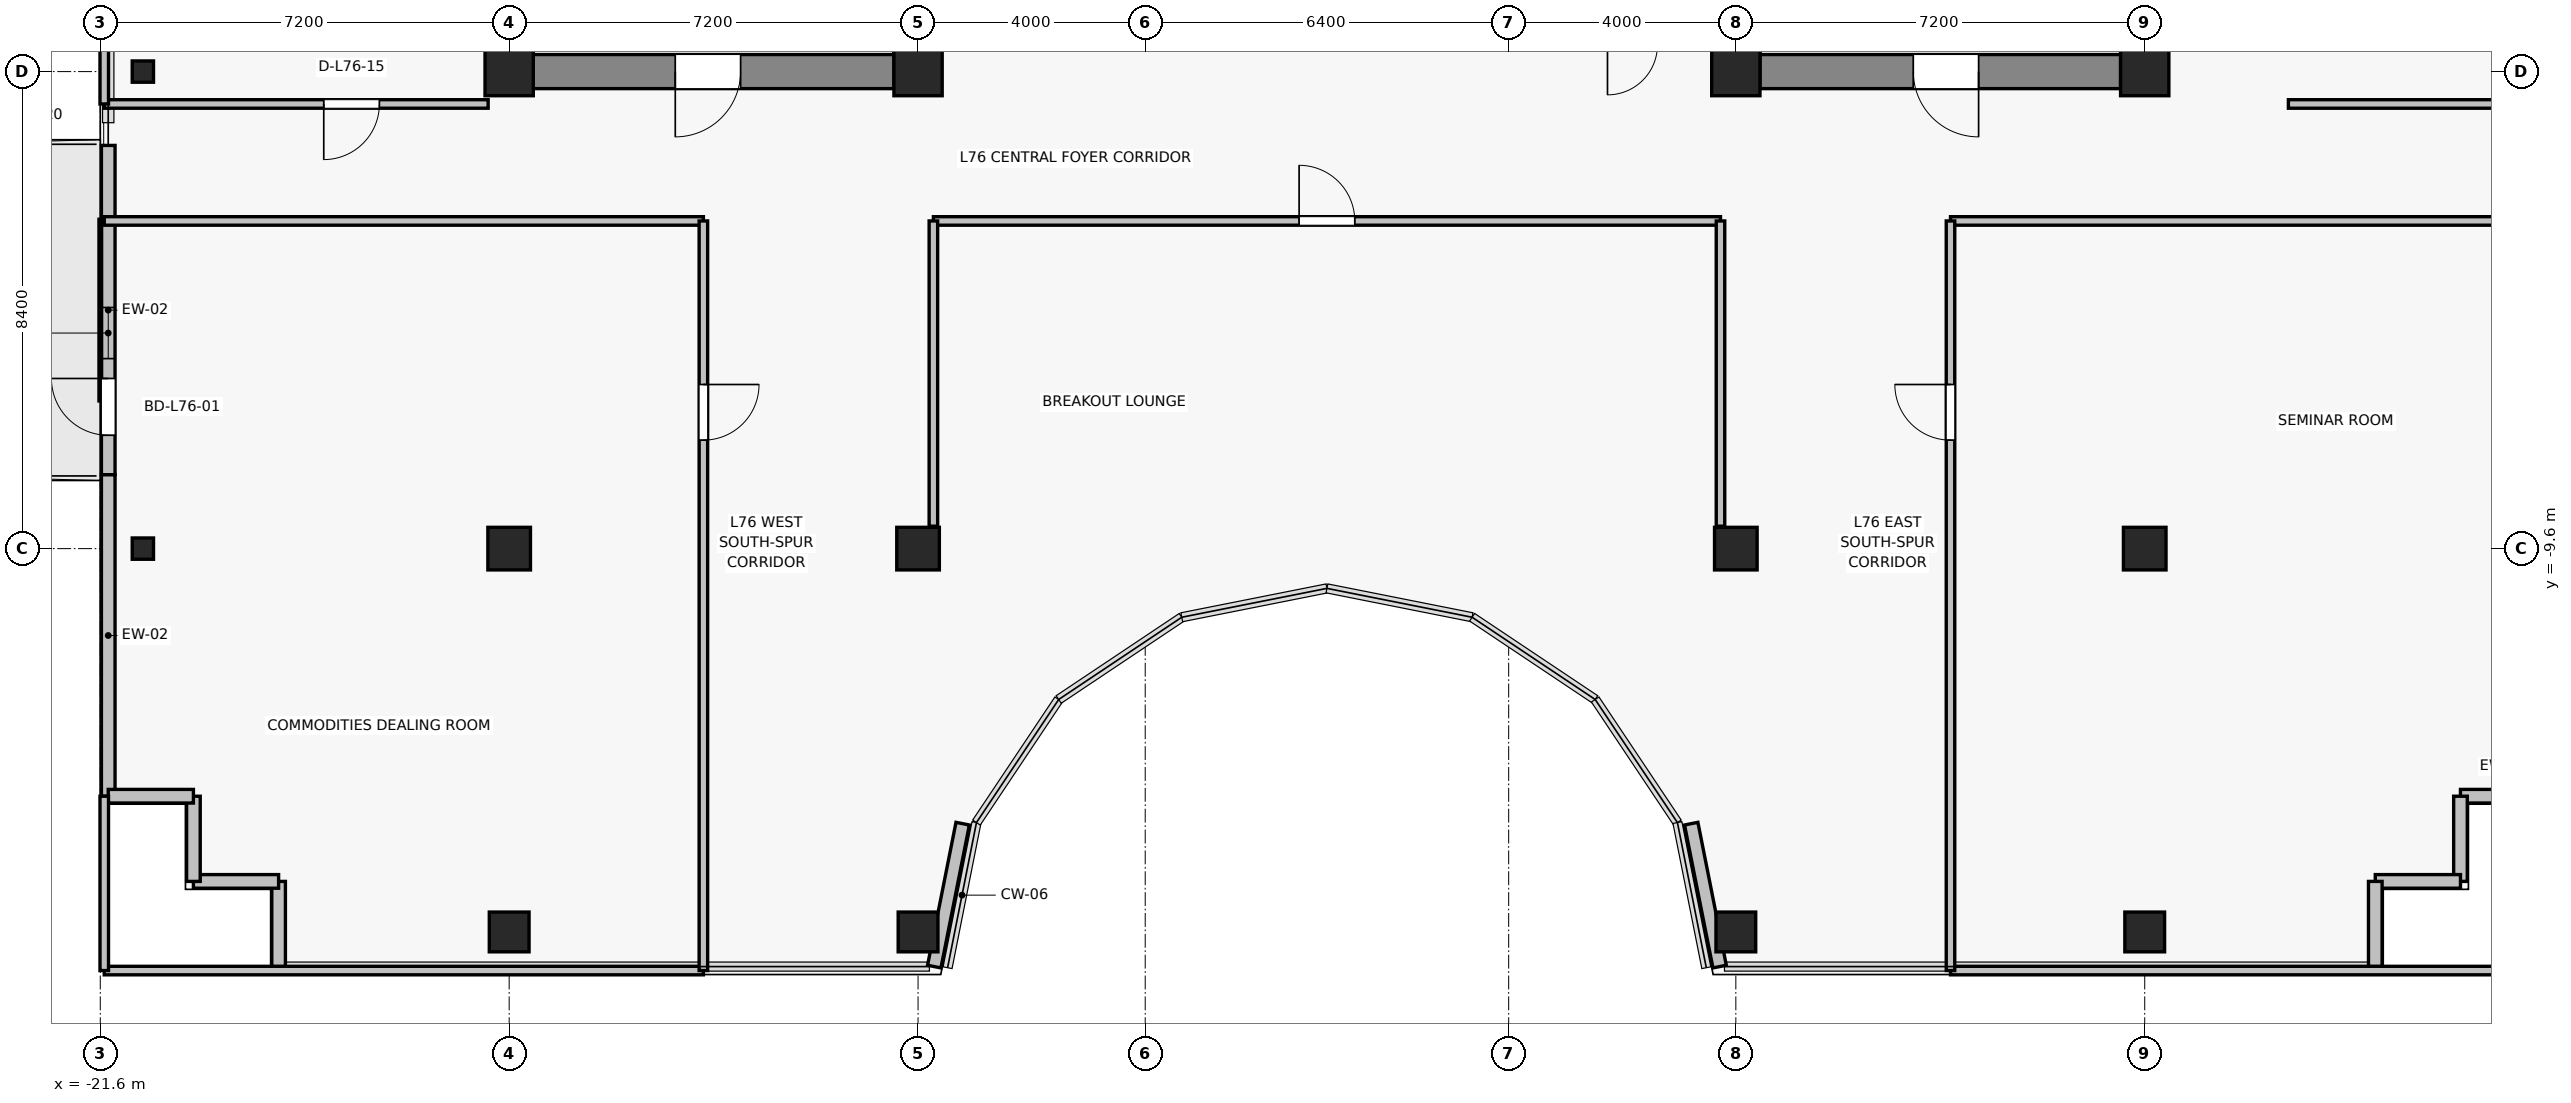
"""IFC4 building model, lengths in metres.
Left out: names, types, materials, properties, quantities, classifications, styles, units other than length and angle.
Written with IfcOpenShell. Run it as: python <this file> out.ifc"""

import sys

from ifc_helpers import new_model, si_unit, direction, frame, frame_2d, origin, origin_2d, place, context, subcontext, project, spatial, rectangle, i_section, extrude, source, transform, mapped, element, fill, save


model = new_model("IFC4")
c1 = context("Model", 3, precision=1e-05, world=origin(), true_north=direction((0.0, 1.0)))
c2 = subcontext(c1, "Body", "Model", "MODEL_VIEW")
j1 = project(units=[si_unit("LENGTHUNIT", "METRE"), si_unit("PLANEANGLEUNIT", "RADIAN")], contexts=[c1])
p1 = place(None, origin())
s1 = spatial("IfcSite", under=j1, at=p1, CompositionType="ELEMENT")
p2 = place(p1, origin())
s2 = spatial("IfcBuilding", under=s1, at=p2, CompositionType="ELEMENT")
p3 = place(p2, frame((0.0, 0.0, 268.3)))
s3 = spatial("IfcBuildingStorey", under=s2, at=p3, CompositionType="ELEMENT", Elevation=268.3)
for number, where, z_axis, x_axis in (
    (1, (-14.4, -1.2, 0.0), (0.0, 0.0, 1.0), (1.0, 0.0, 0.0)),
    (2, (-7.2, -1.2, 0.0), (0.0, 0.0, 1.0), (1.0, 0.0, 0.0)),
    (3, (7.2, -1.2, 0.0), (0.0, 0.0, 1.0), (1.0, 0.0, 0.0)),
    (4, (14.4, -1.2, 0.0), (0.0, 0.0, 1.0), (1.0, 0.0, 0.0)),
):
    element("IfcColumn", number, at=place(p3, frame(where, z_axis=z_axis, x_axis=x_axis)), inside=s3, PredefinedType="COLUMN", context=c2, shape_type="SweptSolid", body=[
        extrude(rectangle(XDim=0.85, YDim=0.85, at=origin_2d()), origin(), (0.0, 0.0, 1.0), 3.3),
    ])
for number, where, z_axis, x_axis in (
    (5, (-14.4, -9.6, 0.0), (0.0, 0.0, 1.0), (1.0, 0.0, 0.0)),
    (6, (-7.2, -9.6, 0.0), (0.0, 0.0, 1.0), (1.0, 0.0, 0.0)),
    (7, (7.2, -9.6, 0.0), (0.0, 0.0, 1.0), (1.0, 0.0, 0.0)),
    (8, (14.4, -9.6, 0.0), (0.0, 0.0, 1.0), (1.0, 0.0, 0.0)),
):
    element("IfcColumn", number, at=place(p3, frame(where, z_axis=z_axis, x_axis=x_axis)), inside=s3, PredefinedType="COLUMN", context=c2, shape_type="SweptSolid", body=[
        extrude(rectangle(XDim=0.75, YDim=0.75, at=origin_2d()), origin(), (0.0, 0.0, 1.0), 3.3),
    ])
for number, where, z_axis, x_axis in (
    (9, (-14.4, -16.35, 0.0), (0.0, 0.0, 1.0), (1.0, 0.0, 0.0)),
    (10, (-7.2, -16.35, 0.0), (0.0, 0.0, 1.0), (1.0, 0.0, 0.0)),
    (11, (7.2, -16.35, 0.0), (0.0, 0.0, 1.0), (1.0, 0.0, 0.0)),
    (12, (14.4, -16.35, 0.0), (0.0, 0.0, 1.0), (1.0, 0.0, 0.0)),
):
    element("IfcColumn", number, at=place(p3, frame(where, z_axis=z_axis, x_axis=x_axis)), inside=s3, PredefinedType="COLUMN", context=c2, shape_type="SweptSolid", body=[
        extrude(rectangle(XDim=0.7, YDim=0.7, at=origin_2d()), origin(), (0.0, 0.0, 1.0), 3.3),
    ])
for number, where, z_axis, x_axis in (
    (13, (-20.85, -9.6, 0.0), (0.0, 0.0, 1.0), (1.0, 0.0, 0.0)),
    (14, (-20.85, -1.2, 0.0), (0.0, 0.0, 1.0), (1.0, 0.0, 0.0)),
):
    element("IfcColumn", number, at=place(p3, frame(where, z_axis=z_axis, x_axis=x_axis)), inside=s3, PredefinedType="COLUMN", context=c2, shape_type="SweptSolid", body=[
        extrude(i_section(OverallWidth=0.375, OverallDepth=0.375, WebThickness=0.017, FlangeThickness=0.027, FilletRadius=0.015, at=origin_2d()), origin(), (0.0, 0.0, 1.0), 3.3),
    ])
p4 = place(p3, frame((-7.625, -1.2, 0.0), z_axis=(0.0, 0.0, 1.0), x_axis=(-1.0, 0.0, 0.0)))
e15 = element("IfcWall", 15, at=p4, inside=s3, PredefinedType="SHEAR", context=c2, shape_type="SweptSolid", body=[
    extrude(rectangle(XDim=6.35, YDim=0.6, at=frame_2d((3.175, 0.0))), origin(), (0.0, 0.0, 1.0), 3.08),
])
p5 = place(p4, frame((2.7, 0.0, 0.0)))
e16 = element("IfcOpeningElement", 16, at=p5, cuts=e15, PredefinedType="OPENING", context=c2, shape_type="SweptSolid", body=[
    extrude(rectangle(XDim=1.15, YDim=2.15, at=frame_2d((0.575, 1.075))), frame((0.0, 0.31, 0.0), z_axis=(0.0, -1.0, 0.0), x_axis=(1.0, 0.0, 0.0)), (0.0, 0.0, 1.0), 0.62),
])
p6 = place(p3, frame((13.975, -1.2, 0.0), z_axis=(0.0, 0.0, 1.0), x_axis=(-1.0, 0.0, 0.0)))
e17 = element("IfcWall", 17, at=p6, inside=s3, PredefinedType="SHEAR", context=c2, shape_type="SweptSolid", body=[
    extrude(rectangle(XDim=6.35, YDim=0.6, at=frame_2d((3.175, 0.0))), origin(), (0.0, 0.0, 1.0), 3.08),
])
p7 = place(p6, frame((2.5, 0.0, 0.0)))
e18 = element("IfcOpeningElement", 18, at=p7, cuts=e17, PredefinedType="OPENING", context=c2, shape_type="SweptSolid", body=[
    extrude(rectangle(XDim=1.15, YDim=2.15, at=frame_2d((0.575, 1.075))), frame((0.0, 0.31, 0.0), z_axis=(0.0, -1.0, 0.0), x_axis=(1.0, 0.0, 0.0)), (0.0, 0.0, 1.0), 0.62),
])
for number, where, z_axis, x_axis in (
    (19, (-7.4, -0.9, 0.0), (0.0, 0.0, 1.0), (0.0, 1.0, 0.0)),
    (20, (7.4, -0.9, 0.0), (0.0, 0.0, 1.0), (0.0, 1.0, 0.0)),
):
    element("IfcWall", number, at=place(p3, frame(where, z_axis=z_axis, x_axis=x_axis)), inside=s3, PredefinedType="SHEAR", context=c2, shape_type="SweptSolid", body=[
        extrude(rectangle(XDim=4.15, YDim=0.45, at=frame_2d((2.075, 0.0))), origin(), (0.0, 0.0, 1.0), 3.08),
    ])
p8 = place(p3, frame((-21.46, -8.3, 0.0), z_axis=(0.0, 0.0, 1.0), x_axis=(0.0, 1.0, 0.0)))
e21 = element("IfcWall", 21, at=p8, inside=s3, PredefinedType="SOLIDWALL", context=c2, shape_type="SweptSolid", body=[
    extrude(rectangle(XDim=5.8, YDim=0.24, at=frame_2d((2.9, 0.0))), origin(), (0.0, 0.0, 1.0), 3.08),
])
p9 = place(p8, frame((0.696, 0.0, 0.0)))
e22 = element("IfcOpeningElement", 22, at=p9, cuts=e21, PredefinedType="OPENING", context=c2, shape_type="SweptSolid", body=[
    extrude(rectangle(XDim=1.0, YDim=2.2, at=frame_2d((0.5, 1.1))), frame((0.0, 0.13, 0.0), z_axis=(0.0, -1.0, 0.0), x_axis=(1.0, 0.0, 0.0)), (0.0, 0.0, 1.0), 0.26),
])
p10 = place(p8, frame((2.046, 0.0, 0.85)))
e23 = element("IfcOpeningElement", 23, at=p10, cuts=e21, PredefinedType="OPENING", context=c2, shape_type="SweptSolid", body=[
    extrude(rectangle(XDim=0.9, YDim=1.35, at=frame_2d((0.45, 0.675))), frame((0.0, 0.13, 0.0), z_axis=(0.0, -1.0, 0.0), x_axis=(1.0, 0.0, 0.0)), (0.0, 0.0, 1.0), 0.26),
])
p11 = place(p3, frame((-21.46, -8.3, 0.0), z_axis=(0.0, 0.0, 1.0), x_axis=(0.0, -1.0, 0.0)))
e24 = element("IfcWall", 24, at=p11, inside=s3, PredefinedType="SOLIDWALL", context=c2, shape_type="SweptSolid", body=[
    extrude(rectangle(XDim=5.66, YDim=0.24, at=frame_2d((2.83, 0.0))), origin(), (0.0, 0.0, 1.0), 3.08),
])
for number, where, z_axis, x_axis in (
    (25, (19.96, -13.96, 0.0), (0.0, 0.0, 1.0), (1.0, 0.0, 0.0)),
    (26, (19.96, -15.46, 0.0), (0.0, 0.0, 1.0), (0.0, 1.0, 0.0)),
    (27, (18.46, -15.46, 0.0), (0.0, 0.0, 1.0), (1.0, 0.0, 0.0)),
    (28, (18.46, -16.96, 0.0), (0.0, 0.0, 1.0), (0.0, 1.0, 0.0)),
):
    element("IfcWall", number, at=place(p3, frame(where, z_axis=z_axis, x_axis=x_axis)), inside=s3, PredefinedType="SOLIDWALL", context=c2, shape_type="SweptSolid", body=[
        extrude(rectangle(XDim=1.5, YDim=0.24, at=frame_2d((0.75, 0.0))), origin(), (0.0, 0.0, 1.0), 3.08),
    ])
for number, where, z_axis, x_axis in (
    (29, (6.414, -14.443, 0.0), (0.0, 0.0, 1.0), (0.195, -0.981, 0.0)),
    (30, (-6.915, -16.96, 0.0), (0.0, 0.0, 1.0), (0.195, 0.981, 0.0)),
):
    element("IfcWall", number, at=place(p3, frame(where, z_axis=z_axis, x_axis=x_axis)), inside=s3, PredefinedType="SOLIDWALL", context=c2, shape_type="SweptSolid", body=[
        extrude(rectangle(XDim=2.566, YDim=0.24, at=frame_2d((1.283, 0.0))), origin(), (0.0, 0.0, 1.0), 2.79),
    ])
for number, where, z_axis, x_axis in (
    (31, (-18.46, -15.46, 0.0), (0.0, 0.0, 1.0), (0.0, -1.0, 0.0)),
    (32, (-19.96, -15.46, 0.0), (0.0, 0.0, 1.0), (1.0, 0.0, 0.0)),
    (33, (-19.96, -13.96, 0.0), (0.0, 0.0, 1.0), (0.0, -1.0, 0.0)),
    (34, (-21.46, -13.96, 0.0), (0.0, 0.0, 1.0), (1.0, 0.0, 0.0)),
):
    element("IfcWall", number, at=place(p3, frame(where, z_axis=z_axis, x_axis=x_axis)), inside=s3, PredefinedType="SOLIDWALL", context=c2, shape_type="SweptSolid", body=[
        extrude(rectangle(XDim=1.5, YDim=0.24, at=frame_2d((0.75, 0.0))), origin(), (0.0, 0.0, 1.0), 3.08),
    ])
p12 = place(p3, frame((-10.98, -17.03, 0.0), z_axis=(0.0, 0.0, 1.0), x_axis=(-1.0, 0.0, 0.0)))
e35 = element("IfcWall", 35, at=p12, inside=s3, PredefinedType="PARTITIONING", context=c2, shape_type="SweptSolid", body=[
    extrude(rectangle(XDim=10.55, YDim=0.15, at=frame_2d((5.275, 0.0))), origin(), (0.0, 0.0, 1.0), 3.08),
])
p13 = place(p3, frame((-21.53, -3.83, 0.0), z_axis=(0.0, 0.0, 1.0), x_axis=(1.0, 0.0, 0.0)))
e36 = element("IfcWall", 36, at=p13, inside=s3, PredefinedType="PARTITIONING", context=c2, shape_type="SweptSolid", body=[
    extrude(rectangle(XDim=10.55, YDim=0.15, at=frame_2d((5.275, 0.0))), origin(), (0.0, 0.0, 1.0), 2.47),
])
p14 = place(p3, frame((-21.53, -17.03, 0.0), z_axis=(0.0, 0.0, 1.0), x_axis=(0.0, 1.0, 0.0)))
e37 = element("IfcWall", 37, at=p14, inside=s3, PredefinedType="PARTITIONING", context=c2, shape_type="SweptSolid", body=[
    extrude(rectangle(XDim=3.07, YDim=0.15, at=frame_2d((1.535, 0.0))), origin(), (0.0, 0.0, 1.0), 3.08),
])
p15 = place(p3, frame((-10.98, -3.83, 0.0), z_axis=(0.0, 0.0, 1.0), x_axis=(0.0, -1.0, 0.0)))
e38 = element("IfcWall", 38, at=p15, inside=s3, PredefinedType="PARTITIONING", context=c2, shape_type="SweptSolid", body=[
    extrude(rectangle(XDim=13.2, YDim=0.15, at=frame_2d((6.6, 0.0))), origin(), (0.0, 0.0, 1.0), 2.47),
])
p16 = place(p15, frame((2.88, 0.0, 0.0)))
e39 = element("IfcOpeningElement", 39, at=p16, cuts=e38, PredefinedType="OPENING", context=c2, shape_type="SweptSolid", body=[
    extrude(rectangle(XDim=0.98, YDim=2.15, at=frame_2d((0.49, 1.075))), frame((0.0, 0.085, 0.0), z_axis=(0.0, -1.0, 0.0), x_axis=(1.0, 0.0, 0.0)), (0.0, 0.0, 1.0), 0.17),
])
p17 = place(p3, frame((21.53, -17.03, 0.0), z_axis=(0.0, 0.0, 1.0), x_axis=(-1.0, 0.0, 0.0)))
e40 = element("IfcWall", 40, at=p17, inside=s3, PredefinedType="PARTITIONING", context=c2, shape_type="SweptSolid", body=[
    extrude(rectangle(XDim=10.55, YDim=0.15, at=frame_2d((5.275, 0.0))), origin(), (0.0, 0.0, 1.0), 3.08),
])
p18 = place(p3, frame((10.98, -3.83, 0.0), z_axis=(0.0, 0.0, 1.0), x_axis=(1.0, 0.0, 0.0)))
e41 = element("IfcWall", 41, at=p18, inside=s3, PredefinedType="PARTITIONING", context=c2, shape_type="SweptSolid", body=[
    extrude(rectangle(XDim=10.55, YDim=0.15, at=frame_2d((5.275, 0.0))), origin(), (0.0, 0.0, 1.0), 2.47),
])
p19 = place(p3, frame((10.98, -17.03, 0.0), z_axis=(0.0, 0.0, 1.0), x_axis=(0.0, 1.0, 0.0)))
e42 = element("IfcWall", 42, at=p19, inside=s3, PredefinedType="PARTITIONING", context=c2, shape_type="SweptSolid", body=[
    extrude(rectangle(XDim=13.2, YDim=0.15, at=frame_2d((6.6, 0.0))), origin(), (0.0, 0.0, 1.0), 2.47),
])
p20 = place(p19, frame((9.34, 0.0, 0.0)))
e43 = element("IfcOpeningElement", 43, at=p20, cuts=e42, PredefinedType="OPENING", context=c2, shape_type="SweptSolid", body=[
    extrude(rectangle(XDim=0.98, YDim=2.15, at=frame_2d((0.49, 1.075))), frame((0.0, 0.085, 0.0), z_axis=(0.0, -1.0, 0.0), x_axis=(1.0, 0.0, 0.0)), (0.0, 0.0, 1.0), 0.17),
])
p21 = place(p3, frame((-6.93, -3.83, 0.0), z_axis=(0.0, 0.0, 1.0), x_axis=(1.0, 0.0, 0.0)))
e44 = element("IfcWall", 44, at=p21, inside=s3, PredefinedType="PARTITIONING", context=c2, shape_type="SweptSolid", body=[
    extrude(rectangle(XDim=13.86, YDim=0.15, at=frame_2d((6.93, 0.0))), origin(), (0.0, 0.0, 1.0), 2.47),
])
p22 = place(p21, frame((6.44, 0.0, 0.0)))
e45 = element("IfcOpeningElement", 45, at=p22, cuts=e44, PredefinedType="OPENING", context=c2, shape_type="SweptSolid", body=[
    extrude(rectangle(XDim=0.98, YDim=2.15, at=frame_2d((0.49, 1.075))), frame((0.0, 0.085, 0.0), z_axis=(0.0, -1.0, 0.0), x_axis=(1.0, 0.0, 0.0)), (0.0, 0.0, 1.0), 0.17),
])
for number, where, z_axis, x_axis in (
    (46, (-6.93, -9.205, 0.0), (0.0, 0.0, 1.0), (0.0, 1.0, 0.0)),
    (47, (6.93, -3.83, 0.0), (0.0, 0.0, 1.0), (0.0, -1.0, 0.0)),
):
    element("IfcWall", number, at=place(p3, frame(where, z_axis=z_axis, x_axis=x_axis)), inside=s3, PredefinedType="PARTITIONING", context=c2, shape_type="SweptSolid", body=[
        extrude(rectangle(XDim=5.375, YDim=0.15, at=frame_2d((2.688, 0.0))), origin(), (0.0, 0.0, 1.0), 2.47),
    ])
p23 = place(p3, frame((-14.77, -1.77, 0.0), z_axis=(0.0, 0.0, 1.0), x_axis=(-1.0, 0.0, 0.0)))
e48 = element("IfcWall", 48, at=p23, inside=s3, PredefinedType="PARTITIONING", context=c2, shape_type="SweptSolid", body=[
    extrude(rectangle(XDim=6.76, YDim=0.15, at=frame_2d((3.38, 0.0))), origin(), (0.0, 0.0, 1.0), 2.79),
])
p24 = place(p23, frame((1.915, 0.0, 0.0)))
e49 = element("IfcOpeningElement", 49, at=p24, cuts=e48, PredefinedType="OPENING", context=c2, shape_type="SweptSolid", body=[
    extrude(rectangle(XDim=0.98, YDim=2.15, at=frame_2d((0.49, 1.075))), frame((0.0, 0.085, 0.0), z_axis=(0.0, -1.0, 0.0), x_axis=(1.0, 0.0, 0.0)), (0.0, 0.0, 1.0), 0.17),
])
p25 = place(p3, frame((-21.53, -1.77, 0.0), z_axis=(0.0, 0.0, 1.0), x_axis=(0.0, 1.0, 0.0)))
e50 = element("IfcWall", 50, at=p25, inside=s3, PredefinedType="PARTITIONING", context=c2, shape_type="SweptSolid", body=[
    extrude(rectangle(XDim=15.65, YDim=0.15, at=frame_2d((7.825, 0.0))), origin(), (0.0, 0.0, 1.0), 3.08),
])
p26 = place(p3, frame((21.53, -1.77, 0.0), z_axis=(0.0, 0.0, 1.0), x_axis=(-1.0, 0.0, 0.0)))
e51 = element("IfcWall", 51, at=p26, inside=s3, PredefinedType="PARTITIONING", context=c2, shape_type="SweptSolid", body=[
    extrude(rectangle(XDim=4.6, YDim=0.15, at=frame_2d((2.3, 0.0))), origin(), (0.0, 0.0, 1.0), 2.79),
])
m1 = source(origin(), c2, "Body", "SweptSolid", [
    extrude(rectangle(XDim=1.0, YDim=2.2, at=frame_2d((0.5, 1.1))), frame((0.0, 0.025, 0.0), z_axis=(0.0, -1.0, 0.0), x_axis=(1.0, 0.0, 0.0)), (0.0, 0.0, 1.0), 0.05),
])
p27 = place(p9, origin())
e52 = element("IfcDoor", 52, at=p27, inside=s3, OperationType="SINGLE_SWING_RIGHT", PredefinedType="DOOR", context=c2, shape_type="MappedRepresentation", body=[
    mapped(m1, transform((0.0, 0.0, 0.0), x_axis=(1.0, 0.0, 0.0), y_axis=(0.0, 1.0, 0.0), z_axis=(0.0, 0.0, 1.0), scale=1.0)),
])
fill(e22, e52)
m2 = source(origin(), c2, "Body", "SweptSolid", [
    extrude(rectangle(XDim=0.9, YDim=1.35, at=frame_2d((0.45, 0.675))), frame((0.0, 0.03, 0.0), z_axis=(0.0, -1.0, 0.0), x_axis=(1.0, 0.0, 0.0)), (0.0, 0.0, 1.0), 0.06),
])
p28 = place(p10, origin())
e53 = element("IfcWindow", 53, at=p28, inside=s3, PartitioningType="SINGLE_PANEL", PredefinedType="WINDOW", context=c2, shape_type="MappedRepresentation", body=[
    mapped(m2, transform((0.0, 0.0, 0.0), x_axis=(1.0, 0.0, 0.0), y_axis=(0.0, 1.0, 0.0), z_axis=(0.0, 0.0, 1.0), scale=1.0)),
])
fill(e23, e53)
m3 = source(origin(), c2, "Body", "SweptSolid", [
    extrude(rectangle(XDim=1.15, YDim=2.15, at=frame_2d((0.575, 1.075))), frame((0.0, 0.025, 0.0), z_axis=(0.0, -1.0, 0.0), x_axis=(1.0, 0.0, 0.0)), (0.0, 0.0, 1.0), 0.05),
])
p29 = place(p5, origin())
e54 = element("IfcDoor", 54, at=p29, inside=s3, OperationType="SINGLE_SWING_RIGHT", PredefinedType="DOOR", context=c2, shape_type="MappedRepresentation", body=[
    mapped(m3, transform((0.0, 0.0, 0.0), x_axis=(1.0, 0.0, 0.0), y_axis=(0.0, 1.0, 0.0), z_axis=(0.0, 0.0, 1.0), scale=1.0)),
])
fill(e16, e54)
p30 = place(p7, origin())
e55 = element("IfcDoor", 55, at=p30, inside=s3, OperationType="SINGLE_SWING_LEFT", PredefinedType="DOOR", context=c2, shape_type="MappedRepresentation", body=[
    mapped(m3, transform((0.0, 0.0, 0.0), x_axis=(1.0, 0.0, 0.0), y_axis=(0.0, 1.0, 0.0), z_axis=(0.0, 0.0, 1.0), scale=1.0)),
])
fill(e18, e55)
m4 = source(origin(), c2, "Body", "SweptSolid", [
    extrude(rectangle(XDim=0.98, YDim=2.15, at=frame_2d((0.49, 1.075))), frame((0.0, 0.025, 0.0), z_axis=(0.0, -1.0, 0.0), x_axis=(1.0, 0.0, 0.0)), (0.0, 0.0, 1.0), 0.05),
])
p31 = place(p16, origin())
e56 = element("IfcDoor", 56, at=p31, inside=s3, OperationType="SINGLE_SWING_LEFT", PredefinedType="DOOR", context=c2, shape_type="MappedRepresentation", body=[
    mapped(m4, transform((0.0, 0.0, 0.0), x_axis=(1.0, 0.0, 0.0), y_axis=(0.0, 1.0, 0.0), z_axis=(0.0, 0.0, 1.0), scale=1.0)),
])
fill(e39, e56)
p32 = place(p20, origin())
e57 = element("IfcDoor", 57, at=p32, inside=s3, OperationType="SINGLE_SWING_RIGHT", PredefinedType="DOOR", context=c2, shape_type="MappedRepresentation", body=[
    mapped(m4, transform((0.0, 0.0, 0.0), x_axis=(1.0, 0.0, 0.0), y_axis=(0.0, 1.0, 0.0), z_axis=(0.0, 0.0, 1.0), scale=1.0)),
])
fill(e43, e57)
p33 = place(p22, origin())
e58 = element("IfcDoor", 58, at=p33, inside=s3, OperationType="SINGLE_SWING_LEFT", PredefinedType="DOOR", context=c2, shape_type="MappedRepresentation", body=[
    mapped(m4, transform((0.0, 0.0, 0.0), x_axis=(1.0, 0.0, 0.0), y_axis=(0.0, 1.0, 0.0), z_axis=(0.0, 0.0, 1.0), scale=1.0)),
])
fill(e45, e58)
p34 = place(p24, origin())
e59 = element("IfcDoor", 59, at=p34, inside=s3, OperationType="SINGLE_SWING_RIGHT", PredefinedType="DOOR", context=c2, shape_type="MappedRepresentation", body=[
    mapped(m4, transform((0.0, 0.0, 0.0), x_axis=(1.0, 0.0, 0.0), y_axis=(0.0, 1.0, 0.0), z_axis=(0.0, 0.0, 1.0), scale=1.0)),
])
fill(e49, e59)
save(model, sys.argv[1])
